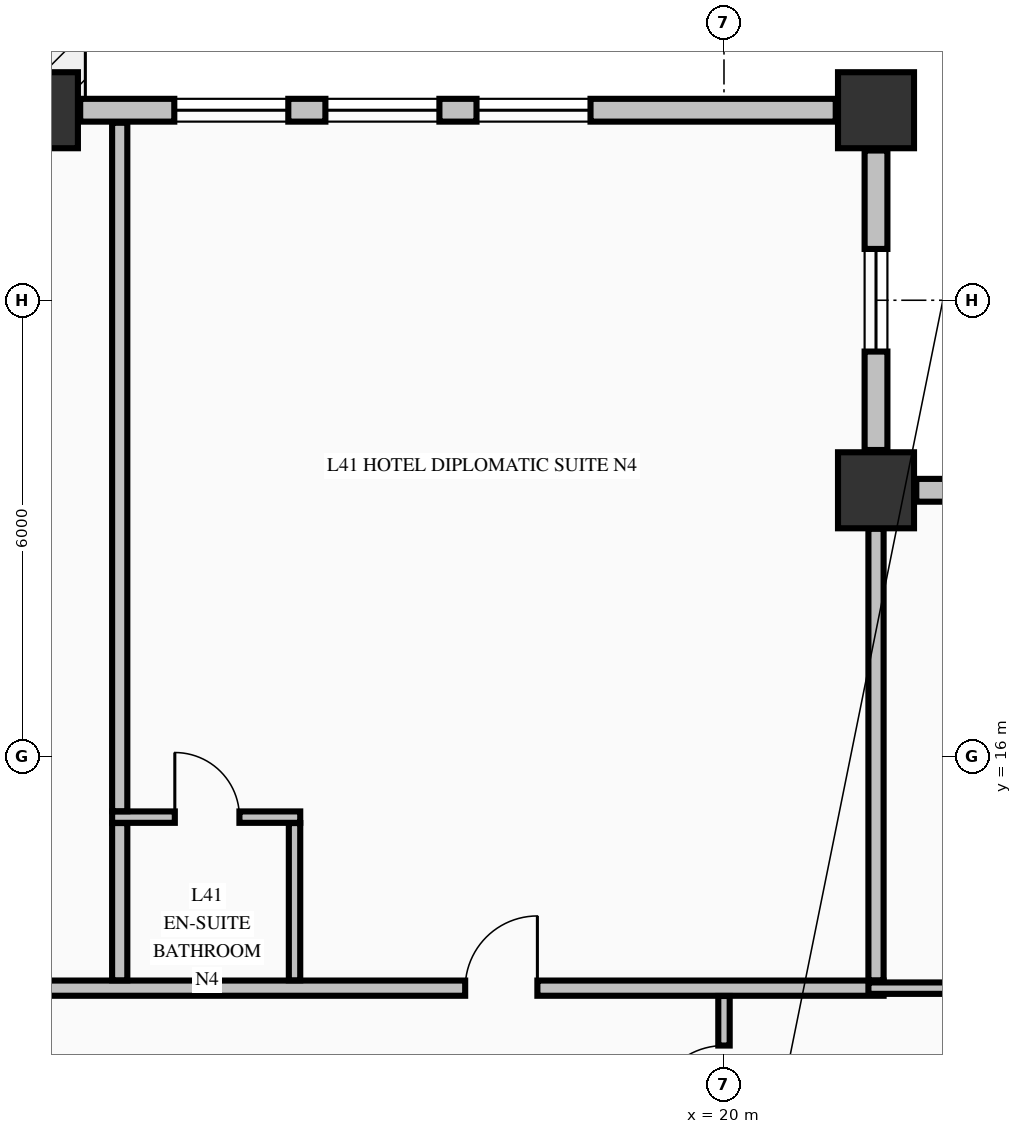
"""IFC4 building model, lengths in metres.
Left out: names, types, materials, properties, quantities, classifications, styles, units other than length and angle.
Written with IfcOpenShell. Run it as: python <this file> out.ifc"""

import sys

from ifc_helpers import new_model, si_unit, direction, frame, frame_2d, origin, origin_2d, place, context, subcontext, project, spatial, rectangle, extrude, element, fill, save


model = new_model("IFC4")
c1 = context("Model", 3, precision=1e-05, world=origin(), true_north=direction((0.0, 1.0)))
c2 = subcontext(c1, "Body", "Model", "MODEL_VIEW")
j1 = project(units=[si_unit("LENGTHUNIT", "METRE"), si_unit("PLANEANGLEUNIT", "RADIAN")], contexts=[c1])
p1 = place(None, origin())
s1 = spatial("IfcSite", under=j1, at=p1, CompositionType="ELEMENT")
p2 = place(p1, origin())
s2 = spatial("IfcBuilding", under=s1, at=p2, CompositionType="ELEMENT")
p3 = place(p2, frame((0.0, 0.0, 162.66)))
s3 = spatial("IfcBuildingStorey", under=s2, at=p3, CompositionType="ELEMENT", Elevation=162.66)
for number, where, z_axis, x_axis in (
    (1, (11.0, 24.5, -0.25), (0.0, 0.0, 1.0), (1.0, 0.0, 0.0)),
    (2, (22.0, 24.5, -0.25), (0.0, 0.0, 1.0), (1.0, 0.0, 0.0)),
    (3, (22.0, 19.5, -0.25), (0.0, 0.0, 1.0), (1.0, 0.0, 0.0)),
):
    element("IfcColumn", number, at=place(p3, frame(where, z_axis=z_axis, x_axis=x_axis)), inside=s3, PredefinedType="COLUMN", context=c2, shape_type="SweptSolid", body=[
        extrude(rectangle(XDim=1.0, YDim=1.0, at=origin_2d()), origin(), (0.0, 0.0, 1.0), 3.4),
    ])
p4 = place(p3, frame((26.47, 19.5, 0.0), z_axis=(0.0, 0.0, 1.0), x_axis=(-1.0, 0.0, 0.0)))
e4 = element("IfcWall", 4, at=p4, inside=s3, PredefinedType="STANDARD", context=c2, shape_type="SweptSolid", body=[
    extrude(rectangle(XDim=3.94, YDim=0.3, at=frame_2d((1.97, 0.0))), origin(), (0.0, 0.0, 1.0), 2.542),
])
p5 = place(p4, frame((1.295, 0.0, 0.68)))
e5 = element("IfcOpeningElement", 5, at=p5, cuts=e4, PredefinedType="OPENING", context=c2, shape_type="SweptSolid", body=[
    extrude(rectangle(XDim=1.35, YDim=1.42, at=frame_2d((0.675, 0.71))), frame((0.0, 0.16, 0.0), z_axis=(0.0, -1.0, 0.0), x_axis=(1.0, 0.0, 0.0)), (0.0, 0.0, 1.0), 0.32),
])
p6 = place(p3, frame((22.0, 20.03, 0.0), z_axis=(0.0, 0.0, 1.0), x_axis=(0.0, 1.0, 0.0)))
e6 = element("IfcWall", 6, at=p6, inside=s3, PredefinedType="STANDARD", context=c2, shape_type="SweptSolid", body=[
    extrude(rectangle(XDim=3.94, YDim=0.3, at=frame_2d((1.97, 0.0))), origin(), (0.0, 0.0, 1.0), 2.542),
])
p7 = place(p6, frame((1.295, 0.0, 0.68)))
e7 = element("IfcOpeningElement", 7, at=p7, cuts=e6, PredefinedType="OPENING", context=c2, shape_type="SweptSolid", body=[
    extrude(rectangle(XDim=1.35, YDim=1.42, at=frame_2d((0.675, 0.71))), frame((0.0, 0.16, 0.0), z_axis=(0.0, -1.0, 0.0), x_axis=(1.0, 0.0, 0.0)), (0.0, 0.0, 1.0), 0.32),
])
p8 = place(p3, frame((21.47, 24.5, 0.0), z_axis=(0.0, 0.0, 1.0), x_axis=(-1.0, 0.0, 0.0)))
e8 = element("IfcWall", 8, at=p8, inside=s3, PredefinedType="STANDARD", context=c2, shape_type="SweptSolid", body=[
    extrude(rectangle(XDim=9.94, YDim=0.3, at=frame_2d((4.97, 0.0))), origin(), (0.0, 0.0, 1.0), 2.542),
])
p9 = place(p8, frame((3.226, 0.0, 0.72)))
e9 = element("IfcOpeningElement", 9, at=p9, cuts=e8, PredefinedType="OPENING", context=c2, shape_type="SweptSolid", body=[
    extrude(rectangle(XDim=1.5, YDim=1.6, at=frame_2d((0.75, 0.8))), frame((0.0, 0.16, 0.0), z_axis=(0.0, -1.0, 0.0), x_axis=(1.0, 0.0, 0.0)), (0.0, 0.0, 1.0), 0.32),
])
p10 = place(p8, frame((5.214, 0.0, 0.72)))
e10 = element("IfcOpeningElement", 10, at=p10, cuts=e8, PredefinedType="OPENING", context=c2, shape_type="SweptSolid", body=[
    extrude(rectangle(XDim=1.5, YDim=1.6, at=frame_2d((0.75, 0.8))), frame((0.0, 0.16, 0.0), z_axis=(0.0, -1.0, 0.0), x_axis=(1.0, 0.0, 0.0)), (0.0, 0.0, 1.0), 0.32),
])
p11 = place(p8, frame((7.202, 0.0, 0.72)))
e11 = element("IfcOpeningElement", 11, at=p11, cuts=e8, PredefinedType="OPENING", context=c2, shape_type="SweptSolid", body=[
    extrude(rectangle(XDim=1.5, YDim=1.6, at=frame_2d((0.75, 0.8))), frame((0.0, 0.16, 0.0), z_axis=(0.0, -1.0, 0.0), x_axis=(1.0, 0.0, 0.0)), (0.0, 0.0, 1.0), 0.32),
])
p12 = place(p3, frame((-17.1, 12.95, 0.0), z_axis=(0.0, 0.0, 1.0), x_axis=(1.0, 0.0, 0.0)))
e12 = element("IfcWall", 12, at=p12, inside=s3, PredefinedType="PARTITIONING", context=c2, shape_type="SweptSolid", body=[
    extrude(rectangle(XDim=39.2, YDim=0.2, at=frame_2d((19.6, 0.0))), origin(), (0.0, 0.0, 1.0), 3.15),
])
p13 = place(p12, frame((3.695, 0.0, 0.0)))
e13 = element("IfcOpeningElement", 13, at=p13, cuts=e12, PredefinedType="OPENING", context=c2, shape_type="SweptSolid", body=[
    extrude(rectangle(XDim=0.95, YDim=2.15, at=frame_2d((0.475, 1.075))), frame((0.0, 0.11, 0.0), z_axis=(0.0, -1.0, 0.0), x_axis=(1.0, 0.0, 0.0)), (0.0, 0.0, 1.0), 0.22),
])
p14 = place(p12, frame((12.925, 0.0, 0.0)))
e14 = element("IfcOpeningElement", 14, at=p14, cuts=e12, PredefinedType="OPENING", context=c2, shape_type="SweptSolid", body=[
    extrude(rectangle(XDim=0.95, YDim=2.15, at=frame_2d((0.475, 1.075))), frame((0.0, 0.11, 0.0), z_axis=(0.0, -1.0, 0.0), x_axis=(1.0, 0.0, 0.0)), (0.0, 0.0, 1.0), 0.22),
])
p15 = place(p12, frame((24.525, 0.0, 0.0)))
e15 = element("IfcOpeningElement", 15, at=p15, cuts=e12, PredefinedType="OPENING", context=c2, shape_type="SweptSolid", body=[
    extrude(rectangle(XDim=0.95, YDim=2.15, at=frame_2d((0.475, 1.075))), frame((0.0, 0.11, 0.0), z_axis=(0.0, -1.0, 0.0), x_axis=(1.0, 0.0, 0.0)), (0.0, 0.0, 1.0), 0.22),
])
p16 = place(p12, frame((33.695, 0.0, 0.0)))
e16 = element("IfcOpeningElement", 16, at=p16, cuts=e12, PredefinedType="OPENING", context=c2, shape_type="SweptSolid", body=[
    extrude(rectangle(XDim=0.95, YDim=2.15, at=frame_2d((0.475, 1.075))), frame((0.0, 0.11, 0.0), z_axis=(0.0, -1.0, 0.0), x_axis=(1.0, 0.0, 0.0)), (0.0, 0.0, 1.0), 0.22),
])
p17 = place(p3, frame((21.9, 12.95, 0.0), z_axis=(0.0, 0.0, 1.0), x_axis=(1.0, 0.0, 0.0)))
e17 = element("IfcWall", 17, at=p17, inside=s3, PredefinedType="PARTITIONING", context=c2, shape_type="SweptSolid", body=[
    extrude(rectangle(XDim=4.935, YDim=0.15, at=frame_2d((2.468, 0.0))), origin(), (0.0, 0.0, 1.0), 3.15),
])
p18 = place(p3, frame((11.95, 15.2, 0.0), z_axis=(0.0, 0.0, 1.0), x_axis=(1.0, 0.0, 0.0)))
e18 = element("IfcWall", 18, at=p18, inside=s3, PredefinedType="PARTITIONING", context=c2, shape_type="SweptSolid", body=[
    extrude(rectangle(XDim=2.475, YDim=0.15, at=frame_2d((1.238, 0.0))), origin(), (0.0, 0.0, 1.0), 3.15),
])
p19 = place(p18, frame((0.825, 0.0, 0.0)))
e19 = element("IfcOpeningElement", 19, at=p19, cuts=e18, PredefinedType="OPENING", context=c2, shape_type="SweptSolid", body=[
    extrude(rectangle(XDim=0.85, YDim=2.1, at=frame_2d((0.425, 1.05))), frame((0.0, 0.085, 0.0), z_axis=(0.0, -1.0, 0.0), x_axis=(1.0, 0.0, 0.0)), (0.0, 0.0, 1.0), 0.17),
])
p20 = place(p3, frame((12.05, 13.053, 0.0), z_axis=(0.0, 0.0, 1.0), x_axis=(0.0, 1.0, 0.0)))
e20 = element("IfcWall", 20, at=p20, inside=s3, PredefinedType="PARTITIONING", context=c2, shape_type="SweptSolid", body=[
    extrude(rectangle(XDim=2.069, YDim=0.2, at=frame_2d((1.035, 0.0))), origin(), (0.0, 0.0, 1.0), 3.15),
])
p21 = place(p3, frame((12.05, 15.278, 0.0), z_axis=(0.0, 0.0, 1.0), x_axis=(0.0, 1.0, 0.0)))
e21 = element("IfcWall", 21, at=p21, inside=s3, PredefinedType="PARTITIONING", context=c2, shape_type="SweptSolid", body=[
    extrude(rectangle(XDim=9.057, YDim=0.2, at=frame_2d((4.528, 0.0))), origin(), (0.0, 0.0, 1.0), 3.15),
])
p22 = place(p3, frame((14.35, 13.053, 0.0), z_axis=(0.0, 0.0, 1.0), x_axis=(0.0, 1.0, 0.0)))
e22 = element("IfcWall", 22, at=p22, inside=s3, PredefinedType="PARTITIONING", context=c2, shape_type="SweptSolid", body=[
    extrude(rectangle(XDim=2.069, YDim=0.15, at=frame_2d((1.035, 0.0))), origin(), (0.0, 0.0, 1.0), 3.15),
])
p23 = place(p3, frame((20.0, 10.931, 0.0), z_axis=(0.0, 0.0, 1.0), x_axis=(0.0, 1.0, 0.0)))
e23 = element("IfcWall", 23, at=p23, inside=s3, PredefinedType="PARTITIONING", context=c2, shape_type="SweptSolid", body=[
    extrude(rectangle(XDim=1.916, YDim=0.15, at=frame_2d((0.958, 0.0))), origin(), (0.0, 0.0, 1.0), 2.342),
])
p24 = place(p23, frame((0.314, 0.0, 0.0)))
e24 = element("IfcOpeningElement", 24, at=p24, cuts=e23, PredefinedType="OPENING", context=c2, shape_type="SweptSolid", body=[
    extrude(rectangle(XDim=0.95, YDim=2.15, at=frame_2d((0.475, 1.075))), frame((0.0, 0.085, 0.0), z_axis=(0.0, -1.0, 0.0), x_axis=(1.0, 0.0, 0.0)), (0.0, 0.0, 1.0), 0.17),
])
p25 = place(p3, frame((22.0, 13.053, 0.0), z_axis=(0.0, 0.0, 1.0), x_axis=(0.0, 1.0, 0.0)))
e25 = element("IfcWall", 25, at=p25, inside=s3, PredefinedType="PARTITIONING", context=c2, shape_type="SweptSolid", body=[
    extrude(rectangle(XDim=5.941, YDim=0.2, at=frame_2d((2.97, 0.0))), origin(), (0.0, 0.0, 1.0), 3.15),
])
p26 = place(p7, origin())
e26 = element("IfcWindow", 26, at=p26, inside=s3, PartitioningType="SINGLE_PANEL", PredefinedType="WINDOW", context=c2, shape_type="SweptSolid", body=[
    extrude(rectangle(XDim=1.35, YDim=1.42, at=frame_2d((0.675, 0.71))), frame((0.0, 0.03, 0.0), z_axis=(0.0, -1.0, 0.0), x_axis=(1.0, 0.0, 0.0)), (0.0, 0.0, 1.0), 0.06),
])
fill(e7, e26)
p27 = place(p9, origin())
e27 = element("IfcWindow", 27, at=p27, inside=s3, PartitioningType="SINGLE_PANEL", PredefinedType="WINDOW", context=c2, shape_type="SweptSolid", body=[
    extrude(rectangle(XDim=1.5, YDim=1.6, at=frame_2d((0.75, 0.8))), frame((0.0, 0.03, 0.0), z_axis=(0.0, -1.0, 0.0), x_axis=(1.0, 0.0, 0.0)), (0.0, 0.0, 1.0), 0.06),
])
fill(e9, e27)
p28 = place(p10, origin())
e28 = element("IfcWindow", 28, at=p28, inside=s3, PartitioningType="SINGLE_PANEL", PredefinedType="WINDOW", context=c2, shape_type="SweptSolid", body=[
    extrude(rectangle(XDim=1.5, YDim=1.6, at=frame_2d((0.75, 0.8))), frame((0.0, 0.03, 0.0), z_axis=(0.0, -1.0, 0.0), x_axis=(1.0, 0.0, 0.0)), (0.0, 0.0, 1.0), 0.06),
])
fill(e10, e28)
p29 = place(p11, origin())
e29 = element("IfcWindow", 29, at=p29, inside=s3, PartitioningType="SINGLE_PANEL", PredefinedType="WINDOW", context=c2, shape_type="SweptSolid", body=[
    extrude(rectangle(XDim=1.5, YDim=1.6, at=frame_2d((0.75, 0.8))), frame((0.0, 0.03, 0.0), z_axis=(0.0, -1.0, 0.0), x_axis=(1.0, 0.0, 0.0)), (0.0, 0.0, 1.0), 0.06),
])
fill(e11, e29)
p30 = place(p16, origin())
e30 = element("IfcDoor", 30, at=p30, inside=s3, OperationType="SINGLE_SWING_RIGHT", PredefinedType="DOOR", context=c2, shape_type="SweptSolid", body=[
    extrude(rectangle(XDim=0.95, YDim=2.15, at=frame_2d((0.475, 1.075))), frame((0.0, 0.025, 0.0), z_axis=(0.0, -1.0, 0.0), x_axis=(1.0, 0.0, 0.0)), (0.0, 0.0, 1.0), 0.05),
])
fill(e16, e30)
p31 = place(p19, origin())
e31 = element("IfcDoor", 31, at=p31, inside=s3, OperationType="SINGLE_SWING_LEFT", PredefinedType="DOOR", context=c2, shape_type="SweptSolid", body=[
    extrude(rectangle(XDim=0.85, YDim=2.1, at=frame_2d((0.425, 1.05))), frame((0.0, 0.025, 0.0), z_axis=(0.0, -1.0, 0.0), x_axis=(1.0, 0.0, 0.0)), (0.0, 0.0, 1.0), 0.05),
])
fill(e19, e31)
p32 = place(p24, origin())
e32 = element("IfcDoor", 32, at=p32, inside=s3, OperationType="SINGLE_SWING_LEFT", PredefinedType="DOOR", context=c2, shape_type="SweptSolid", body=[
    extrude(rectangle(XDim=0.95, YDim=2.15, at=frame_2d((0.475, 1.075))), frame((0.0, 0.025, 0.0), z_axis=(0.0, -1.0, 0.0), x_axis=(1.0, 0.0, 0.0)), (0.0, 0.0, 1.0), 0.05),
])
fill(e24, e32)
save(model, sys.argv[1])
